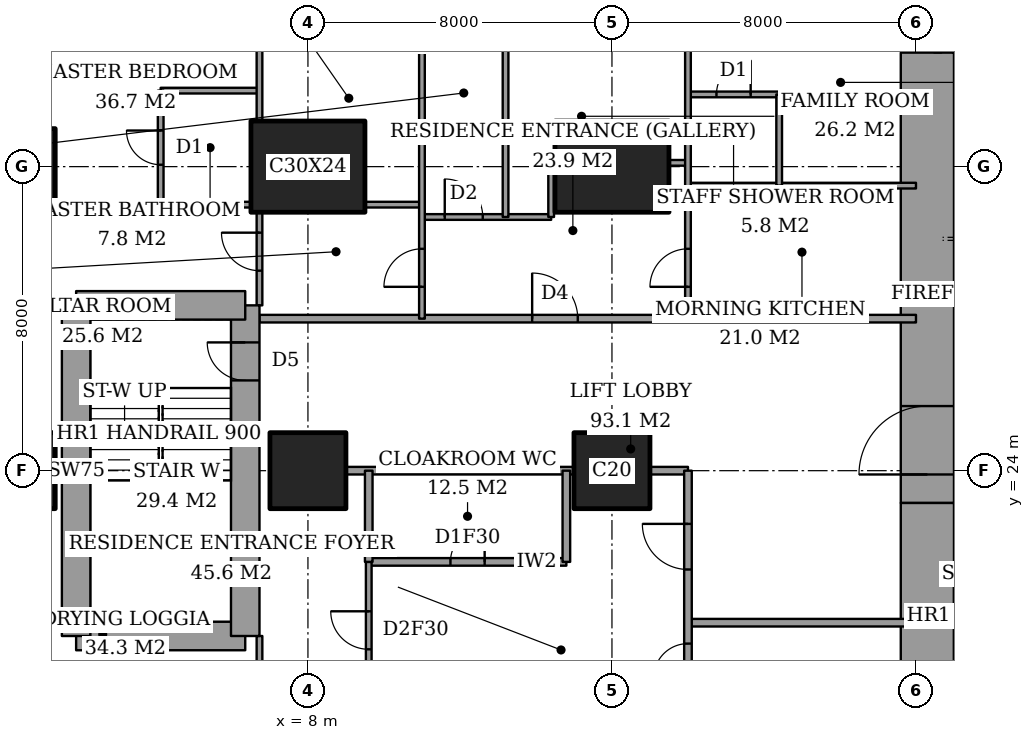
"""IFC4 building model, lengths in metres.
Left out: names, types, materials, properties, quantities, classifications, styles, units other than length and angle.
Written with IfcOpenShell. Run it as: python <this file> out.ifc"""

import sys

from ifc_helpers import new_model, si_unit, direction, frame, frame_2d, origin, origin_2d, place, context, subcontext, project, spatial, rectangle, extrude, element, fill, save


model = new_model("IFC4")
c1 = context("Model", 3, precision=1e-05, world=origin(), true_north=direction((0.0, 1.0)))
c2 = subcontext(c1, "Body", "Model", "MODEL_VIEW")
j1 = project(units=[si_unit("LENGTHUNIT", "METRE"), si_unit("PLANEANGLEUNIT", "RADIAN")], contexts=[c1])
p1 = place(None, origin())
s1 = spatial("IfcSite", under=j1, at=p1, CompositionType="ELEMENT")
p2 = place(p1, origin())
s2 = spatial("IfcBuilding", under=s1, at=p2, CompositionType="ELEMENT")
p3 = place(p2, frame((0.0, 0.0, 107.0)))
s3 = spatial("IfcBuildingStorey", under=s2, at=p3, CompositionType="ELEMENT", Elevation=107.0)
for number, where, z_axis, x_axis in (
    (1, (0.35, 24.0, 0.0), (0.0, 0.0, 1.0), (1.0, 0.0, 0.0)),
    (2, (0.35, 32.0, 0.0), (0.0, 0.0, 1.0), (1.0, 0.0, 0.0)),
    (3, (8.0, 24.0, 0.0), (0.0, 0.0, 1.0), (1.0, 0.0, 0.0)),
):
    element("IfcColumn", number, at=place(p3, frame(where, z_axis=z_axis, x_axis=x_axis)), inside=s3, PredefinedType="COLUMN", context=c2, shape_type="SweptSolid", body=[
        extrude(rectangle(XDim=2.0, YDim=2.0, at=origin_2d()), origin(), (0.0, 0.0, 1.0), 3.6),
    ])
p4 = place(p3, frame((8.0, 32.0, 0.0), z_axis=(0.0, 0.0, 1.0), x_axis=(1.0, 0.0, 0.0)))
e4 = element("IfcColumn", 4, at=p4, inside=s3, PredefinedType="COLUMN", context=c2, shape_type="SweptSolid", body=[
    extrude(rectangle(XDim=3.0, YDim=2.4, at=origin_2d()), origin(), (0.0, 0.0, 1.0), 3.6),
])
p5 = place(p3, frame((16.0, 24.0, 0.0), z_axis=(0.0, 0.0, 1.0), x_axis=(1.0, 0.0, 0.0)))
e5 = element("IfcColumn", 5, at=p5, inside=s3, PredefinedType="COLUMN", context=c2, shape_type="SweptSolid", body=[
    extrude(rectangle(XDim=2.0, YDim=2.0, at=origin_2d()), origin(), (0.0, 0.0, 1.0), 3.6),
])
p6 = place(p3, frame((16.0, 32.0, 0.0), z_axis=(0.0, 0.0, 1.0), x_axis=(1.0, 0.0, 0.0)))
e6 = element("IfcColumn", 6, at=p6, inside=s3, PredefinedType="COLUMN", context=c2, shape_type="SweptSolid", body=[
    extrude(rectangle(XDim=3.0, YDim=2.4, at=origin_2d()), origin(), (0.0, 0.0, 1.0), 3.6),
])
p7 = place(p3, frame((24.3, 13.0, 0.0), z_axis=(0.0, 0.0, 1.0), x_axis=(0.0, 1.0, 0.0)))
e7 = element("IfcWall", 7, at=p7, inside=s3, PredefinedType="SHEAR", context=c2, shape_type="SweptSolid", body=[
    extrude(rectangle(XDim=10.15, YDim=1.4, at=frame_2d((5.075, 0.0))), origin(), (0.0, 0.0, 1.0), 3.6),
])
p8 = place(p3, frame((24.3, 23.15, 0.0), z_axis=(0.0, 0.0, 1.0), x_axis=(0.0, 1.0, 0.0)))
e8 = element("IfcWall", 8, at=p8, inside=s3, PredefinedType="SHEAR", context=c2, shape_type="SweptSolid", body=[
    extrude(rectangle(XDim=11.85, YDim=1.4, at=frame_2d((5.925, 0.0))), origin(), (0.0, 0.0, 1.0), 3.6),
])
p9 = place(p8, frame((0.75, 0.0, 0.0)))
e9 = element("IfcOpeningElement", 9, at=p9, cuts=e8, PredefinedType="OPENING", context=c2, shape_type="SweptSolid", body=[
    extrude(rectangle(XDim=1.8, YDim=2.4, at=frame_2d((0.9, 1.2))), frame((0.0, 0.71, 0.0), z_axis=(0.0, -1.0, 0.0), x_axis=(1.0, 0.0, 0.0)), (0.0, 0.0, 1.0), 1.42),
])
p10 = place(p3, frame((1.9, 19.65, 0.0), z_axis=(0.0, 0.0, 1.0), x_axis=(1.0, 0.0, 0.0)))
e10 = element("IfcWall", 10, at=p10, inside=s3, PredefinedType="SHEAR", context=c2, shape_type="SweptSolid", body=[
    extrude(rectangle(XDim=4.45, YDim=0.75, at=frame_2d((2.225, 0.0))), origin(), (0.0, 0.0, 1.0), 3.6),
])
p11 = place(p3, frame((6.35, 19.65, 0.0), z_axis=(0.0, 0.0, 1.0), x_axis=(0.0, 1.0, 0.0)))
e11 = element("IfcWall", 11, at=p11, inside=s3, PredefinedType="SHEAR", context=c2, shape_type="SweptSolid", body=[
    extrude(rectangle(XDim=8.7, YDim=0.75, at=frame_2d((4.35, 0.0))), origin(), (0.0, 0.0, 1.0), 3.6),
])
p12 = place(p11, frame((6.725, 0.0, 0.0)))
e12 = element("IfcOpeningElement", 12, at=p12, cuts=e11, PredefinedType="OPENING", context=c2, shape_type="SweptSolid", body=[
    extrude(rectangle(XDim=1.0, YDim=2.1, at=frame_2d((0.5, 1.05))), frame((0.0, 0.385, 0.0), z_axis=(0.0, -1.0, 0.0), x_axis=(1.0, 0.0, 0.0)), (0.0, 0.0, 1.0), 0.77),
])
p13 = place(p3, frame((6.35, 28.35, 0.0), z_axis=(0.0, 0.0, 1.0), x_axis=(-1.0, 0.0, 0.0)))
e13 = element("IfcWall", 13, at=p13, inside=s3, PredefinedType="SHEAR", context=c2, shape_type="SweptSolid", body=[
    extrude(rectangle(XDim=4.45, YDim=0.75, at=frame_2d((2.225, 0.0))), origin(), (0.0, 0.0, 1.0), 3.6),
])
p14 = place(p3, frame((1.9, 28.35, 0.0), z_axis=(0.0, 0.0, 1.0), x_axis=(0.0, -1.0, 0.0)))
e14 = element("IfcWall", 14, at=p14, inside=s3, PredefinedType="SHEAR", context=c2, shape_type="SweptSolid", body=[
    extrude(rectangle(XDim=8.7, YDim=0.75, at=frame_2d((4.35, 0.0))), origin(), (0.0, 0.0, 1.0), 3.6),
])
p15 = place(p3, frame((18.0, 20.0, 0.0), z_axis=(0.0, 0.0, 1.0), x_axis=(1.0, 0.0, 0.0)))
e15 = element("IfcWall", 15, at=p15, inside=s3, PredefinedType="PARTITIONING", context=c2, shape_type="SweptSolid", body=[
    extrude(rectangle(XDim=6.0, YDim=0.2, at=frame_2d((3.0, 0.0))), origin(), (0.0, 0.0, 1.0), 3.35),
])
p16 = place(p3, frame((9.6, 21.6, 0.0), z_axis=(0.0, 0.0, 1.0), x_axis=(1.0, 0.0, 0.0)))
e16 = element("IfcWall", 16, at=p16, inside=s3, PredefinedType="PARTITIONING", context=c2, shape_type="SweptSolid", body=[
    extrude(rectangle(XDim=5.2, YDim=0.2, at=frame_2d((2.6, 0.0))), origin(), (0.0, 0.0, 1.0), 3.35),
])
p17 = place(p16, frame((2.15, 0.0, 0.0)))
e17 = element("IfcOpeningElement", 17, at=p17, cuts=e16, PredefinedType="OPENING", context=c2, shape_type="SweptSolid", body=[
    extrude(rectangle(XDim=0.9, YDim=2.1, at=frame_2d((0.45, 1.05))), frame((0.0, 0.11, 0.0), z_axis=(0.0, -1.0, 0.0), x_axis=(1.0, 0.0, 0.0)), (0.0, 0.0, 1.0), 0.22),
])
p18 = place(p3, frame((9.0, 24.0, 0.0), z_axis=(0.0, 0.0, 1.0), x_axis=(1.0, 0.0, 0.0)))
e18 = element("IfcWall", 18, at=p18, inside=s3, PredefinedType="PARTITIONING", context=c2, shape_type="SweptSolid", body=[
    extrude(rectangle(XDim=6.0, YDim=0.2, at=frame_2d((3.0, 0.0))), origin(), (0.0, 0.0, 1.0), 3.35),
])
p19 = place(p3, frame((17.0, 24.0, 0.0), z_axis=(0.0, 0.0, 1.0), x_axis=(1.0, 0.0, 0.0)))
e19 = element("IfcWall", 19, at=p19, inside=s3, PredefinedType="PARTITIONING", context=c2, shape_type="SweptSolid", body=[
    extrude(rectangle(XDim=1.0, YDim=0.2, at=frame_2d((0.5, 0.0))), origin(), (0.0, 0.0, 1.0), 3.35),
])
p20 = place(p3, frame((6.725, 28.0, 0.0), z_axis=(0.0, 0.0, 1.0), x_axis=(1.0, 0.0, 0.0)))
e20 = element("IfcWall", 20, at=p20, inside=s3, PredefinedType="PARTITIONING", context=c2, shape_type="SweptSolid", body=[
    extrude(rectangle(XDim=17.275, YDim=0.2, at=frame_2d((8.637, 0.0))), origin(), (0.0, 0.0, 1.0), 3.35),
])
p21 = place(p20, frame((7.175, 0.0, 0.0)))
e21 = element("IfcOpeningElement", 21, at=p21, cuts=e20, PredefinedType="OPENING", context=c2, shape_type="SweptSolid", body=[
    extrude(rectangle(XDim=1.2, YDim=2.4, at=frame_2d((0.6, 1.2))), frame((0.0, 0.11, 0.0), z_axis=(0.0, -1.0, 0.0), x_axis=(1.0, 0.0, 0.0)), (0.0, 0.0, 1.0), 0.22),
])
p22 = place(p3, frame((11.0, 30.675, 0.0), z_axis=(0.0, 0.0, 1.0), x_axis=(1.0, 0.0, 0.0)))
e22 = element("IfcWall", 22, at=p22, inside=s3, PredefinedType="PARTITIONING", context=c2, shape_type="SweptSolid", body=[
    extrude(rectangle(XDim=3.4, YDim=0.15, at=frame_2d((1.7, 0.0))), origin(), (0.0, 0.0, 1.0), 3.35),
])
p23 = place(p22, frame((0.6, 0.0, 0.0)))
e23 = element("IfcOpeningElement", 23, at=p23, cuts=e22, PredefinedType="OPENING", context=c2, shape_type="SweptSolid", body=[
    extrude(rectangle(XDim=1.0, YDim=2.1, at=frame_2d((0.5, 1.05))), frame((0.0, 0.085, 0.0), z_axis=(0.0, -1.0, 0.0), x_axis=(1.0, 0.0, 0.0)), (0.0, 0.0, 1.0), 0.17),
])
p24 = place(p3, frame((1.35, 31.0, 0.0), z_axis=(0.0, 0.0, 1.0), x_axis=(1.0, 0.0, 0.0)))
e24 = element("IfcWall", 24, at=p24, inside=s3, PredefinedType="PARTITIONING", context=c2, shape_type="SweptSolid", body=[
    extrude(rectangle(XDim=5.15, YDim=0.15, at=frame_2d((2.575, 0.0))), origin(), (0.0, 0.0, 1.0), 3.35),
])
p25 = place(p3, frame((9.5, 31.0, 0.0), z_axis=(0.0, 0.0, 1.0), x_axis=(1.0, 0.0, 0.0)))
e25 = element("IfcWall", 25, at=p25, inside=s3, PredefinedType="PARTITIONING", context=c2, shape_type="SweptSolid", body=[
    extrude(rectangle(XDim=1.5, YDim=0.15, at=frame_2d((0.75, 0.0))), origin(), (0.0, 0.0, 1.0), 3.35),
])
p26 = place(p3, frame((18.0, 31.5, 0.0), z_axis=(0.0, 0.0, 1.0), x_axis=(1.0, 0.0, 0.0)))
e26 = element("IfcWall", 26, at=p26, inside=s3, PredefinedType="PARTITIONING", context=c2, shape_type="SweptSolid", body=[
    extrude(rectangle(XDim=6.0, YDim=0.15, at=frame_2d((3.0, 0.0))), origin(), (0.0, 0.0, 1.0), 3.35),
])
p27 = place(p3, frame((17.5, 32.1, 0.0), z_axis=(0.0, 0.0, 1.0), x_axis=(1.0, 0.0, 0.0)))
e27 = element("IfcWall", 27, at=p27, inside=s3, PredefinedType="PARTITIONING", context=c2, shape_type="SweptSolid", body=[
    extrude(rectangle(XDim=0.5, YDim=0.15, at=frame_2d((0.25, 0.0))), origin(), (0.0, 0.0, 1.0), 2.634),
])
p28 = place(p3, frame((18.0, 33.9, 0.0), z_axis=(0.0, 0.0, 1.0), x_axis=(1.0, 0.0, 0.0)))
e28 = element("IfcWall", 28, at=p28, inside=s3, PredefinedType="PARTITIONING", context=c2, shape_type="SweptSolid", body=[
    extrude(rectangle(XDim=2.4, YDim=0.15, at=frame_2d((1.2, 0.0))), origin(), (0.0, 0.0, 1.0), 3.35),
])
p29 = place(p28, frame((0.75, 0.0, 0.0)))
e29 = element("IfcOpeningElement", 29, at=p29, cuts=e28, PredefinedType="OPENING", context=c2, shape_type="SweptSolid", body=[
    extrude(rectangle(XDim=0.9, YDim=2.1, at=frame_2d((0.45, 1.05))), frame((0.0, 0.085, 0.0), z_axis=(0.0, -1.0, 0.0), x_axis=(1.0, 0.0, 0.0)), (0.0, 0.0, 1.0), 0.17),
])
p30 = place(p3, frame((4.125, 34.0, 0.0), z_axis=(0.0, 0.0, 1.0), x_axis=(1.0, 0.0, 0.0)))
e30 = element("IfcWall", 30, at=p30, inside=s3, PredefinedType="PARTITIONING", context=c2, shape_type="SweptSolid", body=[
    extrude(rectangle(XDim=2.6, YDim=0.15, at=frame_2d((1.3, 0.0))), origin(), (0.0, 0.0, 1.0), 3.35),
])
p31 = place(p3, frame((4.125, 31.0, 0.0), z_axis=(0.0, 0.0, 1.0), x_axis=(0.0, 1.0, 0.0)))
e31 = element("IfcWall", 31, at=p31, inside=s3, PredefinedType="PARTITIONING", context=c2, shape_type="SweptSolid", body=[
    extrude(rectangle(XDim=3.0, YDim=0.15, at=frame_2d((1.5, 0.0))), origin(), (0.0, 0.0, 1.0), 3.35),
])
p32 = place(p31, frame((1.05, 0.0, 0.0)))
e32 = element("IfcOpeningElement", 32, at=p32, cuts=e31, PredefinedType="OPENING", context=c2, shape_type="SweptSolid", body=[
    extrude(rectangle(XDim=0.9, YDim=2.1, at=frame_2d((0.45, 1.05))), frame((0.0, 0.085, 0.0), z_axis=(0.0, -1.0, 0.0), x_axis=(1.0, 0.0, 0.0)), (0.0, 0.0, 1.0), 0.17),
])
p33 = place(p3, frame((6.725, 17.2, 0.0), z_axis=(0.0, 0.0, 1.0), x_axis=(0.0, 1.0, 0.0)))
e33 = element("IfcWall", 33, at=p33, inside=s3, PredefinedType="PARTITIONING", context=c2, shape_type="SweptSolid", body=[
    extrude(rectangle(XDim=2.45, YDim=0.15, at=frame_2d((1.225, 0.0))), origin(), (0.0, 0.0, 1.0), 3.35),
])
p34 = place(p33, frame((0.587, 0.0, 0.0)))
e34 = element("IfcOpeningElement", 34, at=p34, cuts=e33, PredefinedType="OPENING", context=c2, shape_type="SweptSolid", body=[
    extrude(rectangle(XDim=0.9, YDim=2.1, at=frame_2d((0.45, 1.05))), frame((0.0, 0.085, 0.0), z_axis=(0.0, -1.0, 0.0), x_axis=(1.0, 0.0, 0.0)), (0.0, 0.0, 1.0), 0.17),
])
p35 = place(p3, frame((6.725, 28.35, 0.0), z_axis=(0.0, 0.0, 1.0), x_axis=(0.0, 1.0, 0.0)))
e35 = element("IfcWall", 35, at=p35, inside=s3, PredefinedType="PARTITIONING", context=c2, shape_type="SweptSolid", body=[
    extrude(rectangle(XDim=2.45, YDim=0.15, at=frame_2d((1.225, 0.0))), origin(), (0.0, 0.0, 1.0), 3.35),
])
p36 = place(p35, frame((0.913, 0.0, 0.0)))
e36 = element("IfcOpeningElement", 36, at=p36, cuts=e35, PredefinedType="OPENING", context=c2, shape_type="SweptSolid", body=[
    extrude(rectangle(XDim=1.0, YDim=2.1, at=frame_2d((0.5, 1.05))), frame((0.0, 0.085, 0.0), z_axis=(0.0, -1.0, 0.0), x_axis=(1.0, 0.0, 0.0)), (0.0, 0.0, 1.0), 0.17),
])
p37 = place(p3, frame((6.725, 33.2, 0.0), z_axis=(0.0, 0.0, 1.0), x_axis=(0.0, 1.0, 0.0)))
e37 = element("IfcWall", 37, at=p37, inside=s3, PredefinedType="PARTITIONING", context=c2, shape_type="SweptSolid", body=[
    extrude(rectangle(XDim=4.0, YDim=0.15, at=frame_2d((2.0, 0.0))), origin(), (0.0, 0.0, 1.0), 3.35),
])
p38 = place(p3, frame((9.6, 21.6, 0.0), z_axis=(0.0, 0.0, 1.0), x_axis=(0.0, 1.0, 0.0)))
e38 = element("IfcWall", 38, at=p38, inside=s3, PredefinedType="PARTITIONING", context=c2, shape_type="SweptSolid", body=[
    extrude(rectangle(XDim=2.4, YDim=0.2, at=frame_2d((1.2, 0.0))), origin(), (0.0, 0.0, 1.0), 3.35),
])
p39 = place(p3, frame((9.6, 10.6, 0.0), z_axis=(0.0, 0.0, 1.0), x_axis=(0.0, 1.0, 0.0)))
e39 = element("IfcWall", 39, at=p39, inside=s3, PredefinedType="PARTITIONING", context=c2, shape_type="SweptSolid", body=[
    extrude(rectangle(XDim=11.0, YDim=0.15, at=frame_2d((5.5, 0.0))), origin(), (0.0, 0.0, 1.0), 3.35),
])
p40 = place(p39, frame((8.7, 0.0, 0.0)))
e40 = element("IfcOpeningElement", 40, at=p40, cuts=e39, PredefinedType="OPENING", context=c2, shape_type="SweptSolid", body=[
    extrude(rectangle(XDim=1.0, YDim=2.1, at=frame_2d((0.5, 1.05))), frame((0.0, 0.085, 0.0), z_axis=(0.0, -1.0, 0.0), x_axis=(1.0, 0.0, 0.0)), (0.0, 0.0, 1.0), 0.17),
])
p41 = place(p3, frame((11.0, 28.0, 0.0), z_axis=(0.0, 0.0, 1.0), x_axis=(0.0, 1.0, 0.0)))
e41 = element("IfcWall", 41, at=p41, inside=s3, PredefinedType="PARTITIONING", context=c2, shape_type="SweptSolid", body=[
    extrude(rectangle(XDim=9.2, YDim=0.15, at=frame_2d((4.6, 0.0))), origin(), (0.0, 0.0, 1.0), 3.35),
])
p42 = place(p41, frame((0.837, 0.0, 0.0)))
e42 = element("IfcOpeningElement", 42, at=p42, cuts=e41, PredefinedType="OPENING", context=c2, shape_type="SweptSolid", body=[
    extrude(rectangle(XDim=1.0, YDim=2.1, at=frame_2d((0.5, 1.05))), frame((0.0, 0.085, 0.0), z_axis=(0.0, -1.0, 0.0), x_axis=(1.0, 0.0, 0.0)), (0.0, 0.0, 1.0), 0.17),
])
p43 = place(p3, frame((13.2, 30.675, 0.0), z_axis=(0.0, 0.0, 1.0), x_axis=(0.0, 1.0, 0.0)))
e43 = element("IfcWall", 43, at=p43, inside=s3, PredefinedType="PARTITIONING", context=c2, shape_type="SweptSolid", body=[
    extrude(rectangle(XDim=6.525, YDim=0.15, at=frame_2d((3.262, 0.0))), origin(), (0.0, 0.0, 1.0), 3.35),
])
p44 = place(p3, frame((14.4, 30.675, 0.0), z_axis=(0.0, 0.0, 1.0), x_axis=(0.0, 1.0, 0.0)))
e44 = element("IfcWall", 44, at=p44, inside=s3, PredefinedType="PARTITIONING", context=c2, shape_type="SweptSolid", body=[
    extrude(rectangle(XDim=1.425, YDim=0.15, at=frame_2d((0.712, 0.0))), origin(), (0.0, 0.0, 1.0), 3.35),
])
p45 = place(p3, frame((14.8, 21.6, 0.0), z_axis=(0.0, 0.0, 1.0), x_axis=(0.0, 1.0, 0.0)))
e45 = element("IfcWall", 45, at=p45, inside=s3, PredefinedType="PARTITIONING", context=c2, shape_type="SweptSolid", body=[
    extrude(rectangle(XDim=2.4, YDim=0.2, at=frame_2d((1.2, 0.0))), origin(), (0.0, 0.0, 1.0), 3.35),
])
p46 = place(p3, frame((18.0, 18.0, 0.0), z_axis=(0.0, 0.0, 1.0), x_axis=(0.0, 1.0, 0.0)))
e46 = element("IfcWall", 46, at=p46, inside=s3, PredefinedType="PARTITIONING", context=c2, shape_type="SweptSolid", body=[
    extrude(rectangle(XDim=6.0, YDim=0.2, at=frame_2d((3.0, 0.0))), origin(), (0.0, 0.0, 1.0), 3.35),
])
p47 = place(p46, frame((3.4, 0.0, 0.0)))
e47 = element("IfcOpeningElement", 47, at=p47, cuts=e46, PredefinedType="OPENING", context=c2, shape_type="SweptSolid", body=[
    extrude(rectangle(XDim=1.2, YDim=2.4, at=frame_2d((0.6, 1.2))), frame((0.0, 0.11, 0.0), z_axis=(0.0, -1.0, 0.0), x_axis=(1.0, 0.0, 0.0)), (0.0, 0.0, 1.0), 0.22),
])
p48 = place(p46, frame((0.55, 0.0, 0.0)))
e48 = element("IfcOpeningElement", 48, at=p48, cuts=e46, PredefinedType="OPENING", context=c2, shape_type="SweptSolid", body=[
    extrude(rectangle(XDim=0.9, YDim=2.1, at=frame_2d((0.45, 1.05))), frame((0.0, 0.11, 0.0), z_axis=(0.0, -1.0, 0.0), x_axis=(1.0, 0.0, 0.0)), (0.0, 0.0, 1.0), 0.22),
])
p49 = place(p3, frame((18.0, 28.0, 0.0), z_axis=(0.0, 0.0, 1.0), x_axis=(0.0, 1.0, 0.0)))
e49 = element("IfcWall", 49, at=p49, inside=s3, PredefinedType="PARTITIONING", context=c2, shape_type="SweptSolid", body=[
    extrude(rectangle(XDim=9.2, YDim=0.15, at=frame_2d((4.6, 0.0))), origin(), (0.0, 0.0, 1.0), 3.35),
])
p50 = place(p49, frame((0.837, 0.0, 0.0)))
e50 = element("IfcOpeningElement", 50, at=p50, cuts=e49, PredefinedType="OPENING", context=c2, shape_type="SweptSolid", body=[
    extrude(rectangle(XDim=1.0, YDim=2.1, at=frame_2d((0.5, 1.05))), frame((0.0, 0.085, 0.0), z_axis=(0.0, -1.0, 0.0), x_axis=(1.0, 0.0, 0.0)), (0.0, 0.0, 1.0), 0.17),
])
p51 = place(p3, frame((20.4, 31.5, 0.0), z_axis=(0.0, 0.0, 1.0), x_axis=(0.0, 1.0, 0.0)))
e51 = element("IfcWall", 51, at=p51, inside=s3, PredefinedType="PARTITIONING", context=c2, shape_type="SweptSolid", body=[
    extrude(rectangle(XDim=2.4, YDim=0.15, at=frame_2d((1.2, 0.0))), origin(), (0.0, 0.0, 1.0), 3.35),
])
p52 = place(p40, origin())
e52 = element("IfcDoor", 52, at=p52, inside=s3, OperationType="SINGLE_SWING_LEFT", PredefinedType="DOOR", context=c2, shape_type="SweptSolid", body=[
    extrude(rectangle(XDim=1.0, YDim=2.1, at=frame_2d((0.5, 1.05))), frame((0.0, 0.025, 0.0), z_axis=(0.0, -1.0, 0.0), x_axis=(1.0, 0.0, 0.0)), (0.0, 0.0, 1.0), 0.05),
])
fill(e40, e52)
p53 = place(p17, origin())
e53 = element("IfcDoor", 53, at=p53, inside=s3, OperationType="SINGLE_SWING_LEFT", PredefinedType="DOOR", context=c2, shape_type="SweptSolid", body=[
    extrude(rectangle(XDim=0.9, YDim=2.1, at=frame_2d((0.45, 1.05))), frame((0.0, 0.025, 0.0), z_axis=(0.0, -1.0, 0.0), x_axis=(1.0, 0.0, 0.0)), (0.0, 0.0, 1.0), 0.05),
])
fill(e17, e53)
p54 = place(p47, origin())
e54 = element("IfcDoor", 54, at=p54, inside=s3, OperationType="SINGLE_SWING_LEFT", PredefinedType="DOOR", context=c2, shape_type="SweptSolid", body=[
    extrude(rectangle(XDim=1.2, YDim=2.4, at=frame_2d((0.6, 1.2))), frame((0.0, 0.025, 0.0), z_axis=(0.0, -1.0, 0.0), x_axis=(1.0, 0.0, 0.0)), (0.0, 0.0, 1.0), 0.05),
])
fill(e47, e54)
p55 = place(p48, origin())
e55 = element("IfcDoor", 55, at=p55, inside=s3, OperationType="SINGLE_SWING_RIGHT", PredefinedType="DOOR", context=c2, shape_type="SweptSolid", body=[
    extrude(rectangle(XDim=0.9, YDim=2.1, at=frame_2d((0.45, 1.05))), frame((0.0, 0.025, 0.0), z_axis=(0.0, -1.0, 0.0), x_axis=(1.0, 0.0, 0.0)), (0.0, 0.0, 1.0), 0.05),
])
fill(e48, e55)
p56 = place(p32, origin())
e56 = element("IfcDoor", 56, at=p56, inside=s3, OperationType="SINGLE_SWING_LEFT", PredefinedType="DOOR", context=c2, shape_type="SweptSolid", body=[
    extrude(rectangle(XDim=0.9, YDim=2.1, at=frame_2d((0.45, 1.05))), frame((0.0, 0.025, 0.0), z_axis=(0.0, -1.0, 0.0), x_axis=(1.0, 0.0, 0.0)), (0.0, 0.0, 1.0), 0.05),
])
fill(e32, e56)
p57 = place(p36, origin())
e57 = element("IfcDoor", 57, at=p57, inside=s3, OperationType="SINGLE_SWING_LEFT", PredefinedType="DOOR", context=c2, shape_type="SweptSolid", body=[
    extrude(rectangle(XDim=1.0, YDim=2.1, at=frame_2d((0.5, 1.05))), frame((0.0, 0.025, 0.0), z_axis=(0.0, -1.0, 0.0), x_axis=(1.0, 0.0, 0.0)), (0.0, 0.0, 1.0), 0.05),
])
fill(e36, e57)
p58 = place(p42, origin())
e58 = element("IfcDoor", 58, at=p58, inside=s3, OperationType="SINGLE_SWING_RIGHT", PredefinedType="DOOR", context=c2, shape_type="SweptSolid", body=[
    extrude(rectangle(XDim=1.0, YDim=2.1, at=frame_2d((0.5, 1.05))), frame((0.0, 0.025, 0.0), z_axis=(0.0, -1.0, 0.0), x_axis=(1.0, 0.0, 0.0)), (0.0, 0.0, 1.0), 0.05),
])
fill(e42, e58)
p59 = place(p21, origin())
e59 = element("IfcDoor", 59, at=p59, inside=s3, OperationType="SINGLE_SWING_RIGHT", PredefinedType="DOOR", context=c2, shape_type="SweptSolid", body=[
    extrude(rectangle(XDim=1.2, YDim=2.4, at=frame_2d((0.6, 1.2))), frame((0.0, 0.025, 0.0), z_axis=(0.0, -1.0, 0.0), x_axis=(1.0, 0.0, 0.0)), (0.0, 0.0, 1.0), 0.05),
])
fill(e21, e59)
p60 = place(p23, origin())
e60 = element("IfcDoor", 60, at=p60, inside=s3, OperationType="SINGLE_SWING_RIGHT", PredefinedType="DOOR", context=c2, shape_type="SweptSolid", body=[
    extrude(rectangle(XDim=1.0, YDim=2.1, at=frame_2d((0.5, 1.05))), frame((0.0, 0.025, 0.0), z_axis=(0.0, -1.0, 0.0), x_axis=(1.0, 0.0, 0.0)), (0.0, 0.0, 1.0), 0.05),
])
fill(e23, e60)
p61 = place(p29, origin())
e61 = element("IfcDoor", 61, at=p61, inside=s3, OperationType="SINGLE_SWING_LEFT", PredefinedType="DOOR", context=c2, shape_type="SweptSolid", body=[
    extrude(rectangle(XDim=0.9, YDim=2.1, at=frame_2d((0.45, 1.05))), frame((0.0, 0.025, 0.0), z_axis=(0.0, -1.0, 0.0), x_axis=(1.0, 0.0, 0.0)), (0.0, 0.0, 1.0), 0.05),
])
fill(e29, e61)
p62 = place(p50, origin())
e62 = element("IfcDoor", 62, at=p62, inside=s3, OperationType="SINGLE_SWING_RIGHT", PredefinedType="DOOR", context=c2, shape_type="SweptSolid", body=[
    extrude(rectangle(XDim=1.0, YDim=2.1, at=frame_2d((0.5, 1.05))), frame((0.0, 0.025, 0.0), z_axis=(0.0, -1.0, 0.0), x_axis=(1.0, 0.0, 0.0)), (0.0, 0.0, 1.0), 0.05),
])
fill(e50, e62)
p63 = place(p9, origin())
e63 = element("IfcDoor", 63, at=p63, inside=s3, OperationType="DOUBLE_DOOR_DOUBLE_SWING", PredefinedType="DOOR", context=c2, shape_type="SweptSolid", body=[
    extrude(rectangle(XDim=1.8, YDim=2.4, at=frame_2d((0.9, 1.2))), frame((0.0, 0.025, 0.0), z_axis=(0.0, -1.0, 0.0), x_axis=(1.0, 0.0, 0.0)), (0.0, 0.0, 1.0), 0.05),
])
fill(e9, e63)
p64 = place(p12, origin())
e64 = element("IfcDoor", 64, at=p64, inside=s3, OperationType="SINGLE_SWING_LEFT", PredefinedType="DOOR", context=c2, shape_type="SweptSolid", body=[
    extrude(rectangle(XDim=1.0, YDim=2.1, at=frame_2d((0.5, 1.05))), frame((0.0, 0.025, 0.0), z_axis=(0.0, -1.0, 0.0), x_axis=(1.0, 0.0, 0.0)), (0.0, 0.0, 1.0), 0.05),
])
fill(e12, e64)
save(model, sys.argv[1])
